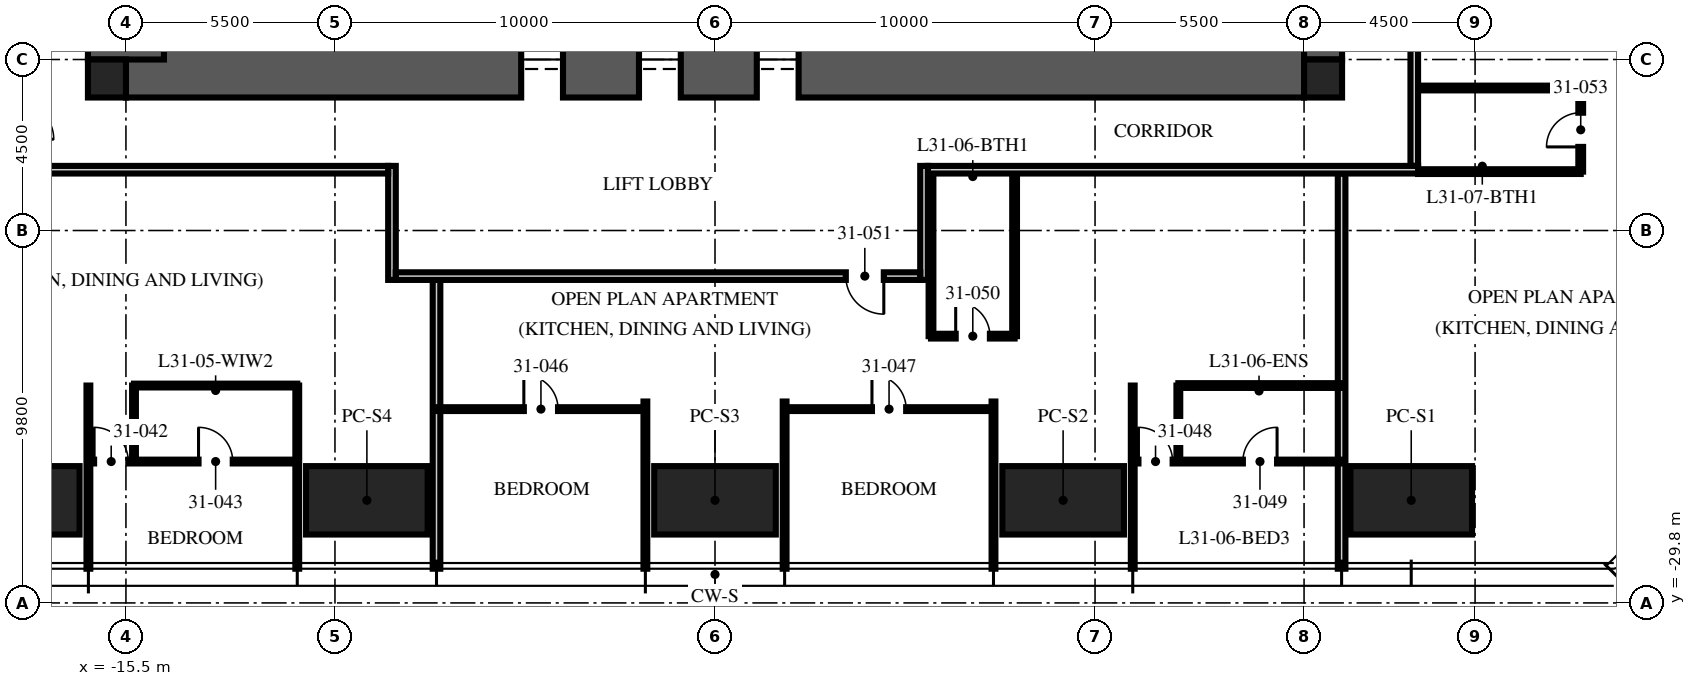
"""IFC4 building model, lengths in metres.
Left out: names, types, materials, properties, quantities, classifications, styles, units other than length and angle.
Written with IfcOpenShell. Run it as: python <this file> out.ifc"""

import sys

from ifc_helpers import new_model, si_unit, direction, frame, frame_2d, origin, origin_2d, place, context, subcontext, project, spatial, rectangle, extrude, element, fill, save


model = new_model("IFC4")
c1 = context("Model", 3, precision=1e-05, world=origin(), true_north=direction((0.0, 1.0)))
c2 = subcontext(c1, "Body", "Model", "MODEL_VIEW")
j1 = project(units=[si_unit("LENGTHUNIT", "METRE"), si_unit("PLANEANGLEUNIT", "RADIAN")], contexts=[c1])
p1 = place(None, origin())
s1 = spatial("IfcSite", under=j1, at=p1, CompositionType="ELEMENT")
p2 = place(p1, origin())
s2 = spatial("IfcBuilding", under=s1, at=p2, CompositionType="ELEMENT")
p3 = place(p2, frame((0.0, 0.0, 126.0)))
s3 = spatial("IfcBuildingStorey", under=s2, at=p3, CompositionType="ELEMENT", Elevation=126.0)
p4 = place(p3, frame((15.5, -15.5, -0.25), z_axis=(0.0, 0.0, 1.0), x_axis=(0.0, 1.0, 0.0)))
e1 = element("IfcWall", 1, at=p4, inside=s3, PredefinedType="SHEAR", context=c2, shape_type="SweptSolid", body=[
    extrude(rectangle(XDim=31.0, YDim=2.0, at=frame_2d((15.5, 0.0))), origin(), (0.0, 0.0, 1.0), 3.75),
])
p5 = place(p4, frame((6.5, 0.0, 0.25)))
e2 = element("IfcOpeningElement", 2, at=p5, cuts=e1, PredefinedType="OPENING", context=c2, shape_type="SweptSolid", body=[
    extrude(rectangle(XDim=1.2, YDim=2.1, at=frame_2d((0.6, 1.05))), frame((0.0, 1.01, 0.0), z_axis=(0.0, -1.0, 0.0), x_axis=(1.0, 0.0, 0.0)), (0.0, 0.0, 1.0), 2.02),
])
p6 = place(p4, frame((23.0, 0.0, 0.25)))
e3 = element("IfcOpeningElement", 3, at=p6, cuts=e1, PredefinedType="OPENING", context=c2, shape_type="SweptSolid", body=[
    extrude(rectangle(XDim=1.8, YDim=2.1, at=frame_2d((0.9, 1.05))), frame((0.0, 1.01, 0.0), z_axis=(0.0, -1.0, 0.0), x_axis=(1.0, 0.0, 0.0)), (0.0, 0.0, 1.0), 2.02),
])
p7 = place(p3, frame((-15.5, -15.5, -0.25), z_axis=(0.0, 0.0, 1.0), x_axis=(1.0, 0.0, 0.0)))
e4 = element("IfcWall", 4, at=p7, inside=s3, PredefinedType="SHEAR", context=c2, shape_type="SweptSolid", body=[
    extrude(rectangle(XDim=31.0, YDim=2.0, at=frame_2d((15.5, 0.0))), origin(), (0.0, 0.0, 1.0), 3.75),
])
p8 = place(p7, frame((10.4, 0.0, 0.25)))
e5 = element("IfcOpeningElement", 5, at=p8, cuts=e4, PredefinedType="OPENING", context=c2, shape_type="SweptSolid", body=[
    extrude(rectangle(XDim=1.1, YDim=2.1, at=frame_2d((0.55, 1.05))), frame((0.0, 1.01, 0.0), z_axis=(0.0, -1.0, 0.0), x_axis=(1.0, 0.0, 0.0)), (0.0, 0.0, 1.0), 2.02),
])
p9 = place(p7, frame((13.5, 0.0, 0.25)))
e6 = element("IfcOpeningElement", 6, at=p9, cuts=e4, PredefinedType="OPENING", context=c2, shape_type="SweptSolid", body=[
    extrude(rectangle(XDim=1.1, YDim=2.1, at=frame_2d((0.55, 1.05))), frame((0.0, 1.01, 0.0), z_axis=(0.0, -1.0, 0.0), x_axis=(1.0, 0.0, 0.0)), (0.0, 0.0, 1.0), 2.02),
])
p10 = place(p7, frame((16.6, 0.0, 0.25)))
e7 = element("IfcOpeningElement", 7, at=p10, cuts=e4, PredefinedType="OPENING", context=c2, shape_type="SweptSolid", body=[
    extrude(rectangle(XDim=1.1, YDim=2.1, at=frame_2d((0.55, 1.05))), frame((0.0, 1.01, 0.0), z_axis=(0.0, -1.0, 0.0), x_axis=(1.0, 0.0, 0.0)), (0.0, 0.0, 1.0), 2.02),
])
p11 = place(p3, frame((-15.5, -15.5, -0.25), z_axis=(0.0, 0.0, 1.0), x_axis=(0.0, 1.0, 0.0)))
e8 = element("IfcWall", 8, at=p11, inside=s3, PredefinedType="SHEAR", context=c2, shape_type="SweptSolid", body=[
    extrude(rectangle(XDim=31.0, YDim=2.0, at=frame_2d((15.5, 0.0))), origin(), (0.0, 0.0, 1.0), 3.75),
])
p12 = place(p11, frame((6.5, 0.0, 0.25)))
e9 = element("IfcOpeningElement", 9, at=p12, cuts=e8, PredefinedType="OPENING", context=c2, shape_type="SweptSolid", body=[
    extrude(rectangle(XDim=1.2, YDim=2.1, at=frame_2d((0.6, 1.05))), frame((0.0, 1.01, 0.0), z_axis=(0.0, -1.0, 0.0), x_axis=(1.0, 0.0, 0.0)), (0.0, 0.0, 1.0), 2.02),
])
p13 = place(p11, frame((23.0, 0.0, 0.25)))
e10 = element("IfcOpeningElement", 10, at=p13, cuts=e8, PredefinedType="OPENING", context=c2, shape_type="SweptSolid", body=[
    extrude(rectangle(XDim=1.8, YDim=2.1, at=frame_2d((0.9, 1.05))), frame((0.0, 1.01, 0.0), z_axis=(0.0, -1.0, 0.0), x_axis=(1.0, 0.0, 0.0)), (0.0, 0.0, 1.0), 2.02),
])
for number, where, z_axis, x_axis in (
    (11, (-16.0, -16.0, -0.25), (0.0, 0.0, 1.0), (1.0, 0.0, 0.0)),
    (12, (16.0, -16.0, -0.25), (0.0, 0.0, 1.0), (1.0, 0.0, 0.0)),
):
    element("IfcColumn", number, at=place(p3, frame(where, z_axis=z_axis, x_axis=x_axis)), inside=s3, PredefinedType="COLUMN", context=c2, shape_type="SweptSolid", body=[
        extrude(rectangle(XDim=1.0, YDim=1.0, at=origin_2d()), origin(), (0.0, 0.0, 1.0), 3.75),
    ])
for number, where, z_axis, x_axis in (
    (13, (18.32, -27.1, 0.0), (0.0, 0.0, 1.0), (1.0, 0.0, 0.0)),
    (14, (9.16, -27.1, 0.0), (0.0, 0.0, 1.0), (1.0, 0.0, 0.0)),
    (15, (0.0, -27.1, 0.0), (0.0, 0.0, 1.0), (1.0, 0.0, 0.0)),
    (16, (-9.16, -27.1, 0.0), (0.0, 0.0, 1.0), (1.0, 0.0, 0.0)),
    (17, (-18.32, -27.1, 0.0), (0.0, 0.0, 1.0), (1.0, 0.0, 0.0)),
):
    element("IfcColumn", number, at=place(p3, frame(where, z_axis=z_axis, x_axis=x_axis)), inside=s3, PredefinedType="COLUMN", context=c2, shape_type="SweptSolid", body=[
        extrude(rectangle(XDim=3.2, YDim=1.8, at=origin_2d()), origin(), (0.0, 0.0, 1.0), 3.75),
    ])
for number, where, z_axis, x_axis in (
    (18, (-16.488, -24.08, 0.0), (0.0, 0.0, 1.0), (0.0, -1.0, 0.0)),
    (19, (-10.992, -24.08, 0.0), (0.0, 0.0, 1.0), (0.0, -1.0, 0.0)),
):
    element("IfcWall", number, at=place(p3, frame(where, z_axis=z_axis, x_axis=x_axis)), inside=s3, PredefinedType="PARTITIONING", context=c2, shape_type="SweptSolid", body=[
        extrude(rectangle(XDim=4.82, YDim=0.1, at=frame_2d((2.41, 0.0))), origin(), (0.0, 0.0, 1.0), 2.81),
    ])
p14 = place(p3, frame((-7.328, -21.3, 0.0), z_axis=(0.0, 0.0, 1.0), x_axis=(0.0, -1.0, 0.0)))
e20 = element("IfcWall", 20, at=p14, inside=s3, PredefinedType="PARTITIONING", context=c2, shape_type="SweptSolid", body=[
    extrude(rectangle(XDim=7.6, YDim=0.2, at=frame_2d((3.8, 0.0))), origin(), (0.0, 0.0, 1.0), 2.81),
])
for number, where, z_axis, x_axis in (
    (21, (-1.832, -24.5, 0.0), (0.0, 0.0, 1.0), (0.0, -1.0, 0.0)),
    (22, (1.832, -24.5, 0.0), (0.0, 0.0, 1.0), (0.0, -1.0, 0.0)),
    (23, (7.328, -24.5, 0.0), (0.0, 0.0, 1.0), (0.0, -1.0, 0.0)),
):
    element("IfcWall", number, at=place(p3, frame(where, z_axis=z_axis, x_axis=x_axis)), inside=s3, PredefinedType="PARTITIONING", context=c2, shape_type="SweptSolid", body=[
        extrude(rectangle(XDim=4.4, YDim=0.1, at=frame_2d((2.2, 0.0))), origin(), (0.0, 0.0, 1.0), 2.81),
    ])
p15 = place(p3, frame((10.992, -24.08, 0.0), z_axis=(0.0, 0.0, 1.0), x_axis=(0.0, -1.0, 0.0)))
e24 = element("IfcWall", 24, at=p15, inside=s3, PredefinedType="PARTITIONING", context=c2, shape_type="SweptSolid", body=[
    extrude(rectangle(XDim=4.82, YDim=0.1, at=frame_2d((2.41, 0.0))), origin(), (0.0, 0.0, 1.0), 2.81),
])
p16 = place(p3, frame((16.488, -18.5, 0.0), z_axis=(0.0, 0.0, 1.0), x_axis=(0.0, -1.0, 0.0)))
e25 = element("IfcWall", 25, at=p16, inside=s3, PredefinedType="PARTITIONING", context=c2, shape_type="SweptSolid", body=[
    extrude(rectangle(XDim=10.4, YDim=0.2, at=frame_2d((5.2, 0.0))), origin(), (0.0, 0.0, 1.0), 2.81),
])
p17 = place(p3, frame((-16.488, -26.08, 0.0), z_axis=(0.0, 0.0, 1.0), x_axis=(1.0, 0.0, 0.0)))
e26 = element("IfcWall", 26, at=p17, inside=s3, PredefinedType="PARTITIONING", context=c2, shape_type="SweptSolid", body=[
    extrude(rectangle(XDim=5.496, YDim=0.1, at=frame_2d((2.748, 0.0))), origin(), (0.0, 0.0, 1.0), 2.81),
])
p18 = place(p17, frame((0.15, 0.0, 0.0)))
e27 = element("IfcOpeningElement", 27, at=p18, cuts=e26, PredefinedType="OPENING", context=c2, shape_type="SweptSolid", body=[
    extrude(rectangle(XDim=0.9, YDim=2.1, at=frame_2d((0.45, 1.05))), frame((0.0, 0.06, 0.0), z_axis=(0.0, -1.0, 0.0), x_axis=(1.0, 0.0, 0.0)), (0.0, 0.0, 1.0), 0.12),
])
p19 = place(p17, frame((2.898, 0.0, 0.0)))
e28 = element("IfcOpeningElement", 28, at=p19, cuts=e26, PredefinedType="OPENING", context=c2, shape_type="SweptSolid", body=[
    extrude(rectangle(XDim=0.9, YDim=2.1, at=frame_2d((0.45, 1.05))), frame((0.0, 0.06, 0.0), z_axis=(0.0, -1.0, 0.0), x_axis=(1.0, 0.0, 0.0)), (0.0, 0.0, 1.0), 0.12),
])
p20 = place(p3, frame((-15.288, -24.08, 0.0), z_axis=(0.0, 0.0, 1.0), x_axis=(0.0, -1.0, 0.0)))
e29 = element("IfcWall", 29, at=p20, inside=s3, PredefinedType="PARTITIONING", context=c2, shape_type="SweptSolid", body=[
    extrude(rectangle(XDim=2.0, YDim=0.1, at=frame_2d((1.0, 0.0))), origin(), (0.0, 0.0, 1.0), 3.5),
])
p21 = place(p3, frame((-15.288, -24.08, 0.0), z_axis=(0.0, 0.0, 1.0), x_axis=(1.0, 0.0, 0.0)))
e30 = element("IfcWall", 30, at=p21, inside=s3, PredefinedType="PARTITIONING", context=c2, shape_type="SweptSolid", body=[
    extrude(rectangle(XDim=4.296, YDim=0.1, at=frame_2d((2.148, 0.0))), origin(), (0.0, 0.0, 1.0), 2.81),
])
p22 = place(p3, frame((-7.328, -24.7, 0.0), z_axis=(0.0, 0.0, 1.0), x_axis=(1.0, 0.0, 0.0)))
e31 = element("IfcWall", 31, at=p22, inside=s3, PredefinedType="PARTITIONING", context=c2, shape_type="SweptSolid", body=[
    extrude(rectangle(XDim=5.496, YDim=0.1, at=frame_2d((2.748, 0.0))), origin(), (0.0, 0.0, 1.0), 2.81),
])
p23 = place(p22, frame((2.298, 0.0, 0.0)))
e32 = element("IfcOpeningElement", 32, at=p23, cuts=e31, PredefinedType="OPENING", context=c2, shape_type="SweptSolid", body=[
    extrude(rectangle(XDim=0.9, YDim=2.1, at=frame_2d((0.45, 1.05))), frame((0.0, 0.06, 0.0), z_axis=(0.0, -1.0, 0.0), x_axis=(1.0, 0.0, 0.0)), (0.0, 0.0, 1.0), 0.12),
])
p24 = place(p3, frame((1.832, -24.7, 0.0), z_axis=(0.0, 0.0, 1.0), x_axis=(1.0, 0.0, 0.0)))
e33 = element("IfcWall", 33, at=p24, inside=s3, PredefinedType="PARTITIONING", context=c2, shape_type="SweptSolid", body=[
    extrude(rectangle(XDim=5.496, YDim=0.1, at=frame_2d((2.748, 0.0))), origin(), (0.0, 0.0, 1.0), 2.81),
])
p25 = place(p24, frame((2.298, 0.0, 0.0)))
e34 = element("IfcOpeningElement", 34, at=p25, cuts=e33, PredefinedType="OPENING", context=c2, shape_type="SweptSolid", body=[
    extrude(rectangle(XDim=0.9, YDim=2.1, at=frame_2d((0.45, 1.05))), frame((0.0, 0.06, 0.0), z_axis=(0.0, -1.0, 0.0), x_axis=(1.0, 0.0, 0.0)), (0.0, 0.0, 1.0), 0.12),
])
p26 = place(p3, frame((10.992, -26.08, 0.0), z_axis=(0.0, 0.0, 1.0), x_axis=(1.0, 0.0, 0.0)))
e35 = element("IfcWall", 35, at=p26, inside=s3, PredefinedType="PARTITIONING", context=c2, shape_type="SweptSolid", body=[
    extrude(rectangle(XDim=5.496, YDim=0.1, at=frame_2d((2.748, 0.0))), origin(), (0.0, 0.0, 1.0), 2.81),
])
p27 = place(p26, frame((0.15, 0.0, 0.0)))
e36 = element("IfcOpeningElement", 36, at=p27, cuts=e35, PredefinedType="OPENING", context=c2, shape_type="SweptSolid", body=[
    extrude(rectangle(XDim=0.9, YDim=2.1, at=frame_2d((0.45, 1.05))), frame((0.0, 0.06, 0.0), z_axis=(0.0, -1.0, 0.0), x_axis=(1.0, 0.0, 0.0)), (0.0, 0.0, 1.0), 0.12),
])
p28 = place(p26, frame((2.898, 0.0, 0.0)))
e37 = element("IfcOpeningElement", 37, at=p28, cuts=e35, PredefinedType="OPENING", context=c2, shape_type="SweptSolid", body=[
    extrude(rectangle(XDim=0.9, YDim=2.1, at=frame_2d((0.45, 1.05))), frame((0.0, 0.06, 0.0), z_axis=(0.0, -1.0, 0.0), x_axis=(1.0, 0.0, 0.0)), (0.0, 0.0, 1.0), 0.12),
])
p29 = place(p3, frame((12.192, -24.08, 0.0), z_axis=(0.0, 0.0, 1.0), x_axis=(0.0, -1.0, 0.0)))
e38 = element("IfcWall", 38, at=p29, inside=s3, PredefinedType="PARTITIONING", context=c2, shape_type="SweptSolid", body=[
    extrude(rectangle(XDim=2.0, YDim=0.1, at=frame_2d((1.0, 0.0))), origin(), (0.0, 0.0, 1.0), 3.5),
])
p30 = place(p3, frame((12.192, -24.08, 0.0), z_axis=(0.0, 0.0, 1.0), x_axis=(1.0, 0.0, 0.0)))
e39 = element("IfcWall", 39, at=p30, inside=s3, PredefinedType="PARTITIONING", context=c2, shape_type="SweptSolid", body=[
    extrude(rectangle(XDim=4.296, YDim=0.125, at=frame_2d((2.148, 0.0))), origin(), (0.0, 0.0, 1.0), 2.81),
])
p31 = place(p3, frame((5.684, -22.78, 0.0), z_axis=(0.0, 0.0, 1.0), x_axis=(1.0, 0.0, 0.0)))
e40 = element("IfcWall", 40, at=p31, inside=s3, PredefinedType="PARTITIONING", context=c2, shape_type="SweptSolid", body=[
    extrude(rectangle(XDim=2.2, YDim=0.125, at=frame_2d((1.1, 0.0))), origin(), (0.0, 0.0, 1.0), 3.5),
])
p32 = place(p31, frame((0.65, 0.0, 0.0)))
e41 = element("IfcOpeningElement", 41, at=p32, cuts=e40, PredefinedType="OPENING", context=c2, shape_type="SweptSolid", body=[
    extrude(rectangle(XDim=0.9, YDim=2.1, at=frame_2d((0.45, 1.05))), frame((0.0, 0.073, 0.0), z_axis=(0.0, -1.0, 0.0), x_axis=(1.0, 0.0, 0.0)), (0.0, 0.0, 1.0), 0.145),
])
for number, where, z_axis, x_axis in (
    (42, (5.684, -18.5, 0.0), (0.0, 0.0, 1.0), (0.0, -1.0, 0.0)),
    (43, (7.884, -18.5, 0.0), (0.0, 0.0, 1.0), (0.0, -1.0, 0.0)),
):
    element("IfcWall", number, at=place(p3, frame(where, z_axis=z_axis, x_axis=x_axis)), inside=s3, PredefinedType="PARTITIONING", context=c2, shape_type="SweptSolid", body=[
        extrude(rectangle(XDim=4.28, YDim=0.125, at=frame_2d((2.14, 0.0))), origin(), (0.0, 0.0, 1.0), 3.5),
    ])
p33 = place(p3, frame((22.78, -18.45, 0.0), z_axis=(0.0, 0.0, 1.0), x_axis=(0.0, 1.0, 0.0)))
e44 = element("IfcWall", 44, at=p33, inside=s3, PredefinedType="PARTITIONING", context=c2, shape_type="SweptSolid", body=[
    extrude(rectangle(XDim=2.2, YDim=0.125, at=frame_2d((1.1, 0.0))), origin(), (0.0, 0.0, 1.0), 2.7),
])
p34 = place(p33, frame((0.65, 0.0, 0.0)))
e45 = element("IfcOpeningElement", 45, at=p34, cuts=e44, PredefinedType="OPENING", context=c2, shape_type="SweptSolid", body=[
    extrude(rectangle(XDim=0.9, YDim=2.1, at=frame_2d((0.45, 1.05))), frame((0.0, 0.073, 0.0), z_axis=(0.0, -1.0, 0.0), x_axis=(1.0, 0.0, 0.0)), (0.0, 0.0, 1.0), 0.145),
])
p35 = place(p3, frame((18.5, -18.45, 0.0), z_axis=(0.0, 0.0, 1.0), x_axis=(1.0, 0.0, 0.0)))
e46 = element("IfcWall", 46, at=p35, inside=s3, PredefinedType="PARTITIONING", context=c2, shape_type="SweptSolid", body=[
    extrude(rectangle(XDim=4.28, YDim=0.125, at=frame_2d((2.14, 0.0))), origin(), (0.0, 0.0, 1.0), 2.3),
])
p36 = place(p3, frame((18.5, -16.25, 0.0), z_axis=(0.0, 0.0, 1.0), x_axis=(1.0, 0.0, 0.0)))
e47 = element("IfcWall", 47, at=p36, inside=s3, PredefinedType="PARTITIONING", context=c2, shape_type="SweptSolid", body=[
    extrude(rectangle(XDim=4.28, YDim=0.125, at=frame_2d((2.14, 0.0))), origin(), (0.0, 0.0, 1.0), 3.5),
])
p37 = place(p3, frame((18.4, -18.3, 0.0), z_axis=(0.0, 0.0, 1.0), x_axis=(0.0, 1.0, 0.0)))
e48 = element("IfcWall", 48, at=p37, inside=s3, PredefinedType="PARTITIONING", context=c2, shape_type="SweptSolid", body=[
    extrude(rectangle(XDim=8.972, YDim=0.2, at=frame_2d((4.486, 0.0))), origin(), (0.0, 0.0, 1.0), 2.3),
])
p38 = place(p3, frame((18.5, -18.4, 0.0), z_axis=(0.0, 0.0, 1.0), x_axis=(-1.0, 0.0, 0.0)))
e49 = element("IfcWall", 49, at=p38, inside=s3, PredefinedType="PARTITIONING", context=c2, shape_type="SweptSolid", body=[
    extrude(rectangle(XDim=12.9, YDim=0.2, at=frame_2d((6.45, 0.0))), origin(), (0.0, 0.0, 1.0), 2.3),
])
for number, where, z_axis, x_axis in (
    (50, (5.5, -18.3, 0.0), (0.0, 0.0, 1.0), (0.0, -1.0, 0.0)),
    (51, (-8.5, -18.3, 0.0), (0.0, 0.0, 1.0), (0.0, -1.0, 0.0)),
):
    element("IfcWall", number, at=place(p3, frame(where, z_axis=z_axis, x_axis=x_axis)), inside=s3, PredefinedType="PARTITIONING", context=c2, shape_type="SweptSolid", body=[
        extrude(rectangle(XDim=3.0, YDim=0.2, at=frame_2d((1.5, 0.0))), origin(), (0.0, 0.0, 1.0), 3.5),
    ])
p39 = place(p3, frame((5.4, -21.2, 0.0), z_axis=(0.0, 0.0, 1.0), x_axis=(-1.0, 0.0, 0.0)))
e52 = element("IfcWall", 52, at=p39, inside=s3, PredefinedType="PARTITIONING", context=c2, shape_type="SweptSolid", body=[
    extrude(rectangle(XDim=13.8, YDim=0.2, at=frame_2d((6.9, 0.0))), origin(), (0.0, 0.0, 1.0), 2.7),
])
p40 = place(p39, frame((0.958, 0.0, 0.0)))
e53 = element("IfcOpeningElement", 53, at=p40, cuts=e52, PredefinedType="OPENING", context=c2, shape_type="SweptSolid", body=[
    extrude(rectangle(XDim=1.0, YDim=2.2, at=frame_2d((0.5, 1.1))), frame((0.0, 0.11, 0.0), z_axis=(0.0, -1.0, 0.0), x_axis=(1.0, 0.0, 0.0)), (0.0, 0.0, 1.0), 0.22),
])
p41 = place(p3, frame((-8.6, -18.4, 0.0), z_axis=(0.0, 0.0, 1.0), x_axis=(-1.0, 0.0, 0.0)))
e54 = element("IfcWall", 54, at=p41, inside=s3, PredefinedType="PARTITIONING", context=c2, shape_type="SweptSolid", body=[
    extrude(rectangle(XDim=9.9, YDim=0.2, at=frame_2d((4.95, 0.0))), origin(), (0.0, 0.0, 1.0), 2.3),
])
p42 = place(p8, origin())
e55 = element("IfcDoor", 55, at=p42, inside=s3, OperationType="DOUBLE_DOOR_SLIDING", PredefinedType="DOOR", context=c2, shape_type="SweptSolid", body=[
    extrude(rectangle(XDim=1.1, YDim=2.1, at=frame_2d((0.55, 1.05))), frame((0.0, 0.025, 0.0), z_axis=(0.0, -1.0, 0.0), x_axis=(1.0, 0.0, 0.0)), (0.0, 0.0, 1.0), 0.05),
])
fill(e5, e55)
p43 = place(p9, origin())
e56 = element("IfcDoor", 56, at=p43, inside=s3, OperationType="DOUBLE_DOOR_SLIDING", PredefinedType="DOOR", context=c2, shape_type="SweptSolid", body=[
    extrude(rectangle(XDim=1.1, YDim=2.1, at=frame_2d((0.55, 1.05))), frame((0.0, 0.025, 0.0), z_axis=(0.0, -1.0, 0.0), x_axis=(1.0, 0.0, 0.0)), (0.0, 0.0, 1.0), 0.05),
])
fill(e6, e56)
p44 = place(p10, origin())
e57 = element("IfcDoor", 57, at=p44, inside=s3, OperationType="DOUBLE_DOOR_SLIDING", PredefinedType="DOOR", context=c2, shape_type="SweptSolid", body=[
    extrude(rectangle(XDim=1.1, YDim=2.1, at=frame_2d((0.55, 1.05))), frame((0.0, 0.025, 0.0), z_axis=(0.0, -1.0, 0.0), x_axis=(1.0, 0.0, 0.0)), (0.0, 0.0, 1.0), 0.05),
])
fill(e7, e57)
p45 = place(p18, origin())
e58 = element("IfcDoor", 58, at=p45, inside=s3, OperationType="SINGLE_SWING_LEFT", PredefinedType="DOOR", context=c2, shape_type="SweptSolid", body=[
    extrude(rectangle(XDim=0.9, YDim=2.1, at=frame_2d((0.45, 1.05))), frame((0.0, 0.025, 0.0), z_axis=(0.0, -1.0, 0.0), x_axis=(1.0, 0.0, 0.0)), (0.0, 0.0, 1.0), 0.05),
])
fill(e27, e58)
p46 = place(p19, origin())
e59 = element("IfcDoor", 59, at=p46, inside=s3, OperationType="SINGLE_SWING_LEFT", PredefinedType="DOOR", context=c2, shape_type="SweptSolid", body=[
    extrude(rectangle(XDim=0.9, YDim=2.1, at=frame_2d((0.45, 1.05))), frame((0.0, 0.025, 0.0), z_axis=(0.0, -1.0, 0.0), x_axis=(1.0, 0.0, 0.0)), (0.0, 0.0, 1.0), 0.05),
])
fill(e28, e59)
p47 = place(p23, origin())
e60 = element("IfcDoor", 60, at=p47, inside=s3, OperationType="SINGLE_SWING_LEFT", PredefinedType="DOOR", context=c2, shape_type="SweptSolid", body=[
    extrude(rectangle(XDim=0.9, YDim=2.1, at=frame_2d((0.45, 1.05))), frame((0.0, 0.025, 0.0), z_axis=(0.0, -1.0, 0.0), x_axis=(1.0, 0.0, 0.0)), (0.0, 0.0, 1.0), 0.05),
])
fill(e32, e60)
p48 = place(p25, origin())
e61 = element("IfcDoor", 61, at=p48, inside=s3, OperationType="SINGLE_SWING_LEFT", PredefinedType="DOOR", context=c2, shape_type="SweptSolid", body=[
    extrude(rectangle(XDim=0.9, YDim=2.1, at=frame_2d((0.45, 1.05))), frame((0.0, 0.025, 0.0), z_axis=(0.0, -1.0, 0.0), x_axis=(1.0, 0.0, 0.0)), (0.0, 0.0, 1.0), 0.05),
])
fill(e34, e61)
p49 = place(p27, origin())
e62 = element("IfcDoor", 62, at=p49, inside=s3, OperationType="SINGLE_SWING_LEFT", PredefinedType="DOOR", context=c2, shape_type="SweptSolid", body=[
    extrude(rectangle(XDim=0.9, YDim=2.1, at=frame_2d((0.45, 1.05))), frame((0.0, 0.025, 0.0), z_axis=(0.0, -1.0, 0.0), x_axis=(1.0, 0.0, 0.0)), (0.0, 0.0, 1.0), 0.05),
])
fill(e36, e62)
p50 = place(p28, origin())
e63 = element("IfcDoor", 63, at=p50, inside=s3, OperationType="SINGLE_SWING_RIGHT", PredefinedType="DOOR", context=c2, shape_type="SweptSolid", body=[
    extrude(rectangle(XDim=0.9, YDim=2.1, at=frame_2d((0.45, 1.05))), frame((0.0, 0.025, 0.0), z_axis=(0.0, -1.0, 0.0), x_axis=(1.0, 0.0, 0.0)), (0.0, 0.0, 1.0), 0.05),
])
fill(e37, e63)
p51 = place(p32, origin())
e64 = element("IfcDoor", 64, at=p51, inside=s3, OperationType="SINGLE_SWING_LEFT", PredefinedType="DOOR", context=c2, shape_type="SweptSolid", body=[
    extrude(rectangle(XDim=0.9, YDim=2.1, at=frame_2d((0.45, 1.05))), frame((0.0, 0.025, 0.0), z_axis=(0.0, -1.0, 0.0), x_axis=(1.0, 0.0, 0.0)), (0.0, 0.0, 1.0), 0.05),
])
fill(e41, e64)
p52 = place(p40, origin())
e65 = element("IfcDoor", 65, at=p52, inside=s3, OperationType="SINGLE_SWING_LEFT", PredefinedType="DOOR", context=c2, shape_type="SweptSolid", body=[
    extrude(rectangle(XDim=1.0, YDim=2.2, at=frame_2d((0.5, 1.1))), frame((0.0, 0.025, 0.0), z_axis=(0.0, -1.0, 0.0), x_axis=(1.0, 0.0, 0.0)), (0.0, 0.0, 1.0), 0.05),
])
fill(e53, e65)
p53 = place(p34, origin())
e66 = element("IfcDoor", 66, at=p53, inside=s3, OperationType="SINGLE_SWING_LEFT", PredefinedType="DOOR", context=c2, shape_type="SweptSolid", body=[
    extrude(rectangle(XDim=0.9, YDim=2.1, at=frame_2d((0.45, 1.05))), frame((0.0, 0.025, 0.0), z_axis=(0.0, -1.0, 0.0), x_axis=(1.0, 0.0, 0.0)), (0.0, 0.0, 1.0), 0.05),
])
fill(e45, e66)
save(model, sys.argv[1])
